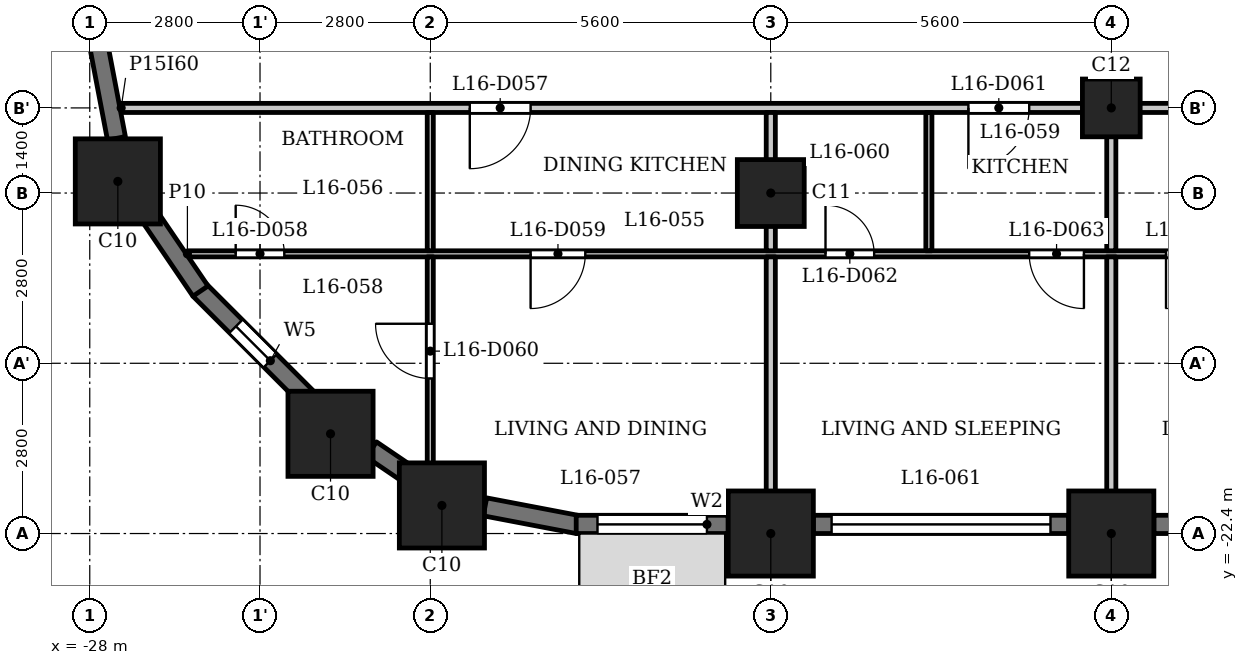
"""IFC4 building model, lengths in metres.
Left out: names, types, materials, properties, quantities, classifications, styles, units other than length and angle.
Written with IfcOpenShell. Run it as: python <this file> out.ifc"""

import sys

from ifc_helpers import new_model, si_unit, direction, frame, frame_2d, origin, origin_2d, place, context, subcontext, project, spatial, rectangle, extrude, element, fill, save


model = new_model("IFC4")
c1 = context("Model", 3, precision=1e-05, world=origin(), true_north=direction((0.0, 1.0)))
c2 = subcontext(c1, "Body", "Model", "MODEL_VIEW")
j1 = project(units=[si_unit("LENGTHUNIT", "METRE"), si_unit("PLANEANGLEUNIT", "RADIAN")], contexts=[c1])
p1 = place(None, origin())
s1 = spatial("IfcSite", under=j1, at=p1, CompositionType="ELEMENT")
p2 = place(p1, origin())
s2 = spatial("IfcBuilding", under=s1, at=p2, CompositionType="ELEMENT")
p3 = place(p2, frame((0.0, 0.0, 65.5)))
s3 = spatial("IfcBuildingStorey", under=s2, at=p3, CompositionType="ELEMENT", Elevation=65.5)
for number, where, z_axis, x_axis in (
    (1, (-22.209, -21.938, 0.0), (0.0, 0.0, 1.0), (1.0, 0.0, 0.0)),
    (2, (-16.8, -22.4, 0.0), (0.0, 0.0, 1.0), (1.0, 0.0, 0.0)),
    (3, (-11.2, -22.4, 0.0), (0.0, 0.0, 1.0), (1.0, 0.0, 0.0)),
    (4, (-27.538, -16.609, 0.0), (0.0, 0.0, 1.0), (1.0, 0.0, 0.0)),
    (5, (-24.04, -20.76, 0.0), (0.0, 0.0, 1.0), (1.0, 0.0, 0.0)),
):
    element("IfcColumn", number, at=place(p3, frame(where, z_axis=z_axis, x_axis=x_axis)), inside=s3, PredefinedType="COLUMN", context=c2, shape_type="SweptSolid", body=[
        extrude(rectangle(XDim=1.4, YDim=1.4, at=origin_2d()), origin(), (0.0, 0.0, 1.0), 3.5),
    ])
p4 = place(p3, frame((-16.8, -16.8, 0.0), z_axis=(0.0, 0.0, 1.0), x_axis=(1.0, 0.0, 0.0)))
e6 = element("IfcColumn", 6, at=p4, inside=s3, PredefinedType="COLUMN", context=c2, shape_type="SweptSolid", body=[
    extrude(rectangle(XDim=1.1, YDim=1.1, at=origin_2d()), origin(), (0.0, 0.0, 1.0), 3.5),
])
p5 = place(p3, frame((-11.2, -15.4, 0.0), z_axis=(0.0, 0.0, 1.0), x_axis=(1.0, 0.0, 0.0)))
e7 = element("IfcColumn", 7, at=p5, inside=s3, PredefinedType="COLUMN", context=c2, shape_type="SweptSolid", body=[
    extrude(rectangle(XDim=0.95, YDim=0.95, at=origin_2d()), origin(), (0.0, 0.0, 1.0), 3.5),
])
p6 = place(p3, frame((-26.197, -18.391, 0.0), z_axis=(0.0, 0.0, 1.0), x_axis=(0.707057949532, -0.707155609469, 0.0)))
e8 = element("IfcWall", 8, at=p6, inside=s3, PredefinedType="SOLIDWALL", context=c2, shape_type="SweptSolid", body=[
    extrude(rectangle(XDim=2.5, YDim=0.3, at=frame_2d((1.25, 0.0))), origin(), (0.0, 0.0, 1.0), 2.35),
])
p7 = place(p6, frame((0.85, 0.0, 0.6)))
e9 = element("IfcOpeningElement", 9, at=p7, cuts=e8, PredefinedType="OPENING", context=c2, shape_type="SweptSolid", body=[
    extrude(rectangle(XDim=0.8, YDim=1.55, at=frame_2d((0.4, 0.775))), frame((0.0, 0.16, 0.0), z_axis=(0.0, -1.0, 0.0), x_axis=(1.0, 0.0, 0.0)), (0.0, 0.0, 1.0), 0.32),
])
p8 = place(p3, frame((-23.368, -21.017, 0.0), z_axis=(0.0, 0.0, 1.0), x_axis=(0.827037530089, -0.562146710232, 0.0)))
e10 = element("IfcWall", 10, at=p8, inside=s3, PredefinedType="SOLIDWALL", context=c2, shape_type="SweptSolid", body=[
    extrude(rectangle(XDim=0.777, YDim=0.3, at=frame_2d((0.388, 0.0))), origin(), (0.0, 0.0, 1.0), 3.2),
])
p9 = place(p3, frame((-21.5, -21.961, 0.0), z_axis=(0.0, 0.0, 1.0), x_axis=(0.982297345734, -0.187328386968, 0.0)))
e11 = element("IfcWall", 11, at=p9, inside=s3, PredefinedType="SOLIDWALL", context=c2, shape_type="SweptSolid", body=[
    extrude(rectangle(XDim=1.556, YDim=0.3, at=frame_2d((0.778, 0.0))), origin(), (0.0, 0.0, 1.0), 2.35),
])
p10 = place(p3, frame((-20.0, -22.25, 0.0), z_axis=(0.0, 0.0, 1.0), x_axis=(1.0, 0.0, 0.0)))
e12 = element("IfcWall", 12, at=p10, inside=s3, PredefinedType="SOLIDWALL", context=c2, shape_type="SweptSolid", body=[
    extrude(rectangle(XDim=2.5, YDim=0.3, at=frame_2d((1.25, 0.0))), origin(), (0.0, 0.0, 1.0), 2.35),
])
p11 = place(p10, frame((0.35, 0.0, 0.9)))
e13 = element("IfcOpeningElement", 13, at=p11, cuts=e12, PredefinedType="OPENING", context=c2, shape_type="SweptSolid", body=[
    extrude(rectangle(XDim=1.8, YDim=1.25, at=frame_2d((0.9, 0.625))), frame((0.0, 0.16, 0.0), z_axis=(0.0, -1.0, 0.0), x_axis=(1.0, 0.0, 0.0)), (0.0, 0.0, 1.0), 0.32),
])
p12 = place(p3, frame((-16.1, -22.25, 0.0), z_axis=(0.0, 0.0, 1.0), x_axis=(1.0, 0.0, 0.0)))
e14 = element("IfcWall", 14, at=p12, inside=s3, PredefinedType="SOLIDWALL", context=c2, shape_type="SweptSolid", body=[
    extrude(rectangle(XDim=4.2, YDim=0.3, at=frame_2d((2.1, 0.0))), origin(), (0.0, 0.0, 1.0), 2.35),
])
p13 = place(p12, frame((0.3, 0.0, 1.2)))
e15 = element("IfcOpeningElement", 15, at=p13, cuts=e14, PredefinedType="OPENING", context=c2, shape_type="SweptSolid", body=[
    extrude(rectangle(XDim=3.6, YDim=0.95, at=frame_2d((1.8, 0.475))), frame((0.0, 0.16, 0.0), z_axis=(0.0, -1.0, 0.0), x_axis=(1.0, 0.0, 0.0)), (0.0, 0.0, 1.0), 0.32),
])
p14 = place(p3, frame((-10.5, -22.25, 0.0), z_axis=(0.0, 0.0, 1.0), x_axis=(1.0, 0.0, 0.0)))
e16 = element("IfcWall", 16, at=p14, inside=s3, PredefinedType="SOLIDWALL", context=c2, shape_type="SweptSolid", body=[
    extrude(rectangle(XDim=4.2, YDim=0.3, at=frame_2d((2.1, 0.0))), origin(), (0.0, 0.0, 1.0), 2.35),
])
p15 = place(p14, frame((0.3, 0.0, 1.2)))
e17 = element("IfcOpeningElement", 17, at=p15, cuts=e16, PredefinedType="OPENING", context=c2, shape_type="SweptSolid", body=[
    extrude(rectangle(XDim=3.6, YDim=0.95, at=frame_2d((1.8, 0.475))), frame((0.0, 0.16, 0.0), z_axis=(0.0, -1.0, 0.0), x_axis=(1.0, 0.0, 0.0)), (0.0, 0.0, 1.0), 0.32),
])
for number, where, z_axis, x_axis in (
    (18, (-27.853, -14.372, 0.0), (0.0, 0.0, 1.0), (0.187, -0.982, 0.0)),
    (19, (-27.053, -17.126, 0.0), (0.0, 0.0, 1.0), (0.562, -0.827, 0.0)),
):
    element("IfcWall", number, at=place(p3, frame(where, z_axis=z_axis, x_axis=x_axis)), inside=s3, PredefinedType="SOLIDWALL", context=c2, shape_type="SweptSolid", body=[
        extrude(rectangle(XDim=1.556, YDim=0.3, at=frame_2d((0.778, 0.0))), origin(), (0.0, 0.0, 1.0), 2.35),
    ])
p16 = place(p3, frame((-26.394, -17.8, 0.0), z_axis=(0.0, 0.0, 1.0), x_axis=(1.0, 0.0, 0.0)))
e20 = element("IfcWall", 20, at=p16, inside=s3, PredefinedType="PARTITIONING", context=c2, shape_type="SweptSolid", body=[
    extrude(rectangle(XDim=53.034, YDim=0.1, at=frame_2d((26.517, 0.0))), origin(), (0.0, 0.0, 1.0), 3.2),
])
p17 = place(p16, frame((0.794, 0.0, 0.0)))
e21 = element("IfcOpeningElement", 21, at=p17, cuts=e20, PredefinedType="OPENING", context=c2, shape_type="SweptSolid", body=[
    extrude(rectangle(XDim=0.8, YDim=2.1, at=frame_2d((0.4, 1.05))), frame((0.0, 0.06, 0.0), z_axis=(0.0, -1.0, 0.0), x_axis=(1.0, 0.0, 0.0)), (0.0, 0.0, 1.0), 0.12),
])
p18 = place(p16, frame((5.644, 0.0, 0.0)))
e22 = element("IfcOpeningElement", 22, at=p18, cuts=e20, PredefinedType="OPENING", context=c2, shape_type="SweptSolid", body=[
    extrude(rectangle(XDim=0.9, YDim=2.1, at=frame_2d((0.45, 1.05))), frame((0.0, 0.06, 0.0), z_axis=(0.0, -1.0, 0.0), x_axis=(1.0, 0.0, 0.0)), (0.0, 0.0, 1.0), 0.12),
])
p19 = place(p16, frame((10.494, 0.0, 0.0)))
e23 = element("IfcOpeningElement", 23, at=p19, cuts=e20, PredefinedType="OPENING", context=c2, shape_type="SweptSolid", body=[
    extrude(rectangle(XDim=0.8, YDim=2.1, at=frame_2d((0.4, 1.05))), frame((0.0, 0.06, 0.0), z_axis=(0.0, -1.0, 0.0), x_axis=(1.0, 0.0, 0.0)), (0.0, 0.0, 1.0), 0.12),
])
p20 = place(p16, frame((13.844, 0.0, 0.0)))
e24 = element("IfcOpeningElement", 24, at=p20, cuts=e20, PredefinedType="OPENING", context=c2, shape_type="SweptSolid", body=[
    extrude(rectangle(XDim=0.9, YDim=2.1, at=frame_2d((0.45, 1.05))), frame((0.0, 0.06, 0.0), z_axis=(0.0, -1.0, 0.0), x_axis=(1.0, 0.0, 0.0)), (0.0, 0.0, 1.0), 0.12),
])
p21 = place(p16, frame((19.344, 0.0, 0.0)))
e25 = element("IfcOpeningElement", 25, at=p21, cuts=e20, PredefinedType="OPENING", context=c2, shape_type="SweptSolid", body=[
    extrude(rectangle(XDim=0.8, YDim=2.1, at=frame_2d((0.4, 1.05))), frame((0.0, 0.06, 0.0), z_axis=(0.0, -1.0, 0.0), x_axis=(1.0, 0.0, 0.0)), (0.0, 0.0, 1.0), 0.12),
])
p22 = place(p16, frame((16.094, 0.0, 0.0)))
e26 = element("IfcOpeningElement", 26, at=p22, cuts=e20, PredefinedType="OPENING", context=c2, shape_type="SweptSolid", body=[
    extrude(rectangle(XDim=0.9, YDim=2.1, at=frame_2d((0.45, 1.05))), frame((0.0, 0.06, 0.0), z_axis=(0.0, -1.0, 0.0), x_axis=(1.0, 0.0, 0.0)), (0.0, 0.0, 1.0), 0.12),
])
p23 = place(p16, frame((24.944, 0.0, 0.0)))
e27 = element("IfcOpeningElement", 27, at=p23, cuts=e20, PredefinedType="OPENING", context=c2, shape_type="SweptSolid", body=[
    extrude(rectangle(XDim=0.8, YDim=2.1, at=frame_2d((0.4, 1.05))), frame((0.0, 0.06, 0.0), z_axis=(0.0, -1.0, 0.0), x_axis=(1.0, 0.0, 0.0)), (0.0, 0.0, 1.0), 0.12),
])
p24 = place(p16, frame((22.444, 0.0, 0.0)))
e28 = element("IfcOpeningElement", 28, at=p24, cuts=e20, PredefinedType="OPENING", context=c2, shape_type="SweptSolid", body=[
    extrude(rectangle(XDim=0.9, YDim=2.1, at=frame_2d((0.45, 1.05))), frame((0.0, 0.06, 0.0), z_axis=(0.0, -1.0, 0.0), x_axis=(1.0, 0.0, 0.0)), (0.0, 0.0, 1.0), 0.12),
])
p25 = place(p16, frame((26.944, 0.0, 0.0)))
e29 = element("IfcOpeningElement", 29, at=p25, cuts=e20, PredefinedType="OPENING", context=c2, shape_type="SweptSolid", body=[
    extrude(rectangle(XDim=0.8, YDim=2.1, at=frame_2d((0.4, 1.05))), frame((0.0, 0.06, 0.0), z_axis=(0.0, -1.0, 0.0), x_axis=(1.0, 0.0, 0.0)), (0.0, 0.0, 1.0), 0.12),
])
p26 = place(p16, frame((29.794, 0.0, 0.0)))
e30 = element("IfcOpeningElement", 30, at=p26, cuts=e20, PredefinedType="OPENING", context=c2, shape_type="SweptSolid", body=[
    extrude(rectangle(XDim=0.9, YDim=2.1, at=frame_2d((0.45, 1.05))), frame((0.0, 0.06, 0.0), z_axis=(0.0, -1.0, 0.0), x_axis=(1.0, 0.0, 0.0)), (0.0, 0.0, 1.0), 0.12),
])
p27 = place(p16, frame((33.394, 0.0, 0.0)))
e31 = element("IfcOpeningElement", 31, at=p27, cuts=e20, PredefinedType="OPENING", context=c2, shape_type="SweptSolid", body=[
    extrude(rectangle(XDim=0.9, YDim=2.1, at=frame_2d((0.45, 1.05))), frame((0.0, 0.06, 0.0), z_axis=(0.0, -1.0, 0.0), x_axis=(1.0, 0.0, 0.0)), (0.0, 0.0, 1.0), 0.12),
])
p28 = place(p16, frame((34.944, 0.0, 0.0)))
e32 = element("IfcOpeningElement", 32, at=p28, cuts=e20, PredefinedType="OPENING", context=c2, shape_type="SweptSolid", body=[
    extrude(rectangle(XDim=0.9, YDim=2.1, at=frame_2d((0.45, 1.05))), frame((0.0, 0.06, 0.0), z_axis=(0.0, -1.0, 0.0), x_axis=(1.0, 0.0, 0.0)), (0.0, 0.0, 1.0), 0.12),
])
p29 = place(p16, frame((38.144, 0.0, 0.0)))
e33 = element("IfcOpeningElement", 33, at=p29, cuts=e20, PredefinedType="OPENING", context=c2, shape_type="SweptSolid", body=[
    extrude(rectangle(XDim=0.8, YDim=2.1, at=frame_2d((0.4, 1.05))), frame((0.0, 0.06, 0.0), z_axis=(0.0, -1.0, 0.0), x_axis=(1.0, 0.0, 0.0)), (0.0, 0.0, 1.0), 0.12),
])
p30 = place(p16, frame((40.244, 0.0, 0.0)))
e34 = element("IfcOpeningElement", 34, at=p30, cuts=e20, PredefinedType="OPENING", context=c2, shape_type="SweptSolid", body=[
    extrude(rectangle(XDim=0.9, YDim=2.1, at=frame_2d((0.45, 1.05))), frame((0.0, 0.06, 0.0), z_axis=(0.0, -1.0, 0.0), x_axis=(1.0, 0.0, 0.0)), (0.0, 0.0, 1.0), 0.12),
])
p31 = place(p16, frame((49.362, 0.0, 0.0)))
e35 = element("IfcOpeningElement", 35, at=p31, cuts=e20, PredefinedType="OPENING", context=c2, shape_type="SweptSolid", body=[
    extrude(rectangle(XDim=0.8, YDim=2.1, at=frame_2d((0.4, 1.05))), frame((0.0, 0.06, 0.0), z_axis=(0.0, -1.0, 0.0), x_axis=(1.0, 0.0, 0.0)), (0.0, 0.0, 1.0), 0.12),
])
p32 = place(p16, frame((45.094, 0.0, 0.0)))
e36 = element("IfcOpeningElement", 36, at=p32, cuts=e20, PredefinedType="OPENING", context=c2, shape_type="SweptSolid", body=[
    extrude(rectangle(XDim=0.9, YDim=2.1, at=frame_2d((0.45, 1.05))), frame((0.0, 0.06, 0.0), z_axis=(0.0, -1.0, 0.0), x_axis=(1.0, 0.0, 0.0)), (0.0, 0.0, 1.0), 0.12),
])
p33 = place(p3, frame((-27.484, -15.4, 0.0), z_axis=(0.0, 0.0, 1.0), x_axis=(1.0, 0.0, 0.0)))
e37 = element("IfcWall", 37, at=p33, inside=s3, PredefinedType="PARTITIONING", context=c2, shape_type="SweptSolid", body=[
    extrude(rectangle(XDim=54.968, YDim=0.15, at=frame_2d((27.484, 0.0))), origin(), (0.0, 0.0, 1.0), 3.2),
])
p34 = place(p33, frame((5.734, 0.0, 0.0)))
e38 = element("IfcOpeningElement", 38, at=p34, cuts=e37, PredefinedType="OPENING", context=c2, shape_type="SweptSolid", body=[
    extrude(rectangle(XDim=1.0, YDim=2.1, at=frame_2d((0.5, 1.05))), frame((0.0, 0.085, 0.0), z_axis=(0.0, -1.0, 0.0), x_axis=(1.0, 0.0, 0.0)), (0.0, 0.0, 1.0), 0.17),
])
p35 = place(p33, frame((13.934, 0.0, 0.0)))
e39 = element("IfcOpeningElement", 39, at=p35, cuts=e37, PredefinedType="OPENING", context=c2, shape_type="SweptSolid", body=[
    extrude(rectangle(XDim=1.0, YDim=2.1, at=frame_2d((0.5, 1.05))), frame((0.0, 0.085, 0.0), z_axis=(0.0, -1.0, 0.0), x_axis=(1.0, 0.0, 0.0)), (0.0, 0.0, 1.0), 0.17),
])
p36 = place(p33, frame((18.184, 0.0, 0.0)))
e40 = element("IfcOpeningElement", 40, at=p36, cuts=e37, PredefinedType="OPENING", context=c2, shape_type="SweptSolid", body=[
    extrude(rectangle(XDim=1.0, YDim=2.1, at=frame_2d((0.5, 1.05))), frame((0.0, 0.085, 0.0), z_axis=(0.0, -1.0, 0.0), x_axis=(1.0, 0.0, 0.0)), (0.0, 0.0, 1.0), 0.17),
])
p37 = place(p33, frame((22.534, 0.0, 0.0)))
e41 = element("IfcOpeningElement", 41, at=p37, cuts=e37, PredefinedType="OPENING", context=c2, shape_type="SweptSolid", body=[
    extrude(rectangle(XDim=1.0, YDim=2.1, at=frame_2d((0.5, 1.05))), frame((0.0, 0.085, 0.0), z_axis=(0.0, -1.0, 0.0), x_axis=(1.0, 0.0, 0.0)), (0.0, 0.0, 1.0), 0.17),
])
p38 = place(p33, frame((36.984, 0.0, 0.0)))
e42 = element("IfcOpeningElement", 42, at=p38, cuts=e37, PredefinedType="OPENING", context=c2, shape_type="SweptSolid", body=[
    extrude(rectangle(XDim=1.0, YDim=2.1, at=frame_2d((0.5, 1.05))), frame((0.0, 0.085, 0.0), z_axis=(0.0, -1.0, 0.0), x_axis=(1.0, 0.0, 0.0)), (0.0, 0.0, 1.0), 0.17),
])
p39 = place(p33, frame((42.334, 0.0, 0.0)))
e43 = element("IfcOpeningElement", 43, at=p39, cuts=e37, PredefinedType="OPENING", context=c2, shape_type="SweptSolid", body=[
    extrude(rectangle(XDim=1.0, YDim=2.1, at=frame_2d((0.5, 1.05))), frame((0.0, 0.085, 0.0), z_axis=(0.0, -1.0, 0.0), x_axis=(1.0, 0.0, 0.0)), (0.0, 0.0, 1.0), 0.17),
])
p40 = place(p33, frame((45.184, 0.0, 0.0)))
e44 = element("IfcOpeningElement", 44, at=p40, cuts=e37, PredefinedType="OPENING", context=c2, shape_type="SweptSolid", body=[
    extrude(rectangle(XDim=1.0, YDim=2.1, at=frame_2d((0.5, 1.05))), frame((0.0, 0.085, 0.0), z_axis=(0.0, -1.0, 0.0), x_axis=(1.0, 0.0, 0.0)), (0.0, 0.0, 1.0), 0.17),
])
p41 = place(p3, frame((-22.4, -21.72, 0.0), z_axis=(0.0, 0.0, 1.0), x_axis=(0.0, 1.0, 0.0)))
e45 = element("IfcWall", 45, at=p41, inside=s3, PredefinedType="PARTITIONING", context=c2, shape_type="SweptSolid", body=[
    extrude(rectangle(XDim=3.87, YDim=0.1, at=frame_2d((1.935, 0.0))), origin(), (0.0, 0.0, 1.0), 3.2),
])
p42 = place(p41, frame((1.87, 0.0, 0.0)))
e46 = element("IfcOpeningElement", 46, at=p42, cuts=e45, PredefinedType="OPENING", context=c2, shape_type="SweptSolid", body=[
    extrude(rectangle(XDim=0.9, YDim=2.1, at=frame_2d((0.45, 1.05))), frame((0.0, 0.06, 0.0), z_axis=(0.0, -1.0, 0.0), x_axis=(1.0, 0.0, 0.0)), (0.0, 0.0, 1.0), 0.12),
])
p43 = place(p3, frame((-22.4, -17.75, 0.0), z_axis=(0.0, 0.0, 1.0), x_axis=(0.0, 1.0, 0.0)))
e47 = element("IfcWall", 47, at=p43, inside=s3, PredefinedType="PARTITIONING", context=c2, shape_type="SweptSolid", body=[
    extrude(rectangle(XDim=2.275, YDim=0.1, at=frame_2d((1.137, 0.0))), origin(), (0.0, 0.0, 1.0), 3.2),
])
p44 = place(p3, frame((-16.8, -23.08, 0.0), z_axis=(0.0, 0.0, 1.0), x_axis=(0.0, 1.0, 0.0)))
e48 = element("IfcWall", 48, at=p44, inside=s3, PredefinedType="PARTITIONING", context=c2, shape_type="SweptSolid", body=[
    extrude(rectangle(XDim=5.23, YDim=0.15, at=frame_2d((2.615, 0.0))), origin(), (0.0, 0.0, 1.0), 3.2),
])
p45 = place(p3, frame((-16.8, -17.75, 0.0), z_axis=(0.0, 0.0, 1.0), x_axis=(0.0, 1.0, 0.0)))
e49 = element("IfcWall", 49, at=p45, inside=s3, PredefinedType="PARTITIONING", context=c2, shape_type="SweptSolid", body=[
    extrude(rectangle(XDim=2.275, YDim=0.15, at=frame_2d((1.137, 0.0))), origin(), (0.0, 0.0, 1.0), 3.2),
])
p46 = place(p3, frame((-14.2, -17.75, 0.0), z_axis=(0.0, 0.0, 1.0), x_axis=(0.0, 1.0, 0.0)))
e50 = element("IfcWall", 50, at=p46, inside=s3, PredefinedType="PARTITIONING", context=c2, shape_type="SweptSolid", body=[
    extrude(rectangle(XDim=2.275, YDim=0.1, at=frame_2d((1.137, 0.0))), origin(), (0.0, 0.0, 1.0), 3.2),
])
p47 = place(p3, frame((-11.2, -23.08, 0.0), z_axis=(0.0, 0.0, 1.0), x_axis=(0.0, 1.0, 0.0)))
e51 = element("IfcWall", 51, at=p47, inside=s3, PredefinedType="PARTITIONING", context=c2, shape_type="SweptSolid", body=[
    extrude(rectangle(XDim=5.23, YDim=0.15, at=frame_2d((2.615, 0.0))), origin(), (0.0, 0.0, 1.0), 3.2),
])
p48 = place(p3, frame((-11.2, -17.75, 0.0), z_axis=(0.0, 0.0, 1.0), x_axis=(0.0, 1.0, 0.0)))
e52 = element("IfcWall", 52, at=p48, inside=s3, PredefinedType="PARTITIONING", context=c2, shape_type="SweptSolid", body=[
    extrude(rectangle(XDim=2.275, YDim=0.15, at=frame_2d((1.137, 0.0))), origin(), (0.0, 0.0, 1.0), 3.2),
])
p49 = place(p34, origin())
e53 = element("IfcDoor", 53, at=p49, inside=s3, OperationType="SINGLE_SWING_LEFT", PredefinedType="DOOR", context=c2, shape_type="SweptSolid", body=[
    extrude(rectangle(XDim=1.0, YDim=2.1, at=frame_2d((0.5, 1.05))), frame((0.0, 0.025, 0.0), z_axis=(0.0, -1.0, 0.0), x_axis=(1.0, 0.0, 0.0)), (0.0, 0.0, 1.0), 0.05),
])
fill(e38, e53)
p50 = place(p17, origin())
e54 = element("IfcDoor", 54, at=p50, inside=s3, OperationType="SINGLE_SWING_RIGHT", PredefinedType="DOOR", context=c2, shape_type="SweptSolid", body=[
    extrude(rectangle(XDim=0.8, YDim=2.1, at=frame_2d((0.4, 1.05))), frame((0.0, 0.025, 0.0), z_axis=(0.0, -1.0, 0.0), x_axis=(1.0, 0.0, 0.0)), (0.0, 0.0, 1.0), 0.05),
])
fill(e21, e54)
p51 = place(p18, origin())
e55 = element("IfcDoor", 55, at=p51, inside=s3, OperationType="SINGLE_SWING_LEFT", PredefinedType="DOOR", context=c2, shape_type="SweptSolid", body=[
    extrude(rectangle(XDim=0.9, YDim=2.1, at=frame_2d((0.45, 1.05))), frame((0.0, 0.025, 0.0), z_axis=(0.0, -1.0, 0.0), x_axis=(1.0, 0.0, 0.0)), (0.0, 0.0, 1.0), 0.05),
])
fill(e22, e55)
p52 = place(p42, origin())
e56 = element("IfcDoor", 56, at=p52, inside=s3, OperationType="SINGLE_SWING_LEFT", PredefinedType="DOOR", context=c2, shape_type="SweptSolid", body=[
    extrude(rectangle(XDim=0.9, YDim=2.1, at=frame_2d((0.45, 1.05))), frame((0.0, 0.025, 0.0), z_axis=(0.0, -1.0, 0.0), x_axis=(1.0, 0.0, 0.0)), (0.0, 0.0, 1.0), 0.05),
])
fill(e46, e56)
p53 = place(p35, origin())
e57 = element("IfcDoor", 57, at=p53, inside=s3, OperationType="SINGLE_SWING_LEFT", PredefinedType="DOOR", context=c2, shape_type="SweptSolid", body=[
    extrude(rectangle(XDim=1.0, YDim=2.1, at=frame_2d((0.5, 1.05))), frame((0.0, 0.025, 0.0), z_axis=(0.0, -1.0, 0.0), x_axis=(1.0, 0.0, 0.0)), (0.0, 0.0, 1.0), 0.05),
])
fill(e39, e57)
p54 = place(p19, origin())
e58 = element("IfcDoor", 58, at=p54, inside=s3, OperationType="SINGLE_SWING_RIGHT", PredefinedType="DOOR", context=c2, shape_type="SweptSolid", body=[
    extrude(rectangle(XDim=0.8, YDim=2.1, at=frame_2d((0.4, 1.05))), frame((0.0, 0.025, 0.0), z_axis=(0.0, -1.0, 0.0), x_axis=(1.0, 0.0, 0.0)), (0.0, 0.0, 1.0), 0.05),
])
fill(e23, e58)
p55 = place(p20, origin())
e59 = element("IfcDoor", 59, at=p55, inside=s3, OperationType="SINGLE_SWING_RIGHT", PredefinedType="DOOR", context=c2, shape_type="SweptSolid", body=[
    extrude(rectangle(XDim=0.9, YDim=2.1, at=frame_2d((0.45, 1.05))), frame((0.0, 0.025, 0.0), z_axis=(0.0, -1.0, 0.0), x_axis=(1.0, 0.0, 0.0)), (0.0, 0.0, 1.0), 0.05),
])
fill(e24, e59)
p56 = place(p22, origin())
e60 = element("IfcDoor", 60, at=p56, inside=s3, OperationType="SINGLE_SWING_LEFT", PredefinedType="DOOR", context=c2, shape_type="SweptSolid", body=[
    extrude(rectangle(XDim=0.9, YDim=2.1, at=frame_2d((0.45, 1.05))), frame((0.0, 0.025, 0.0), z_axis=(0.0, -1.0, 0.0), x_axis=(1.0, 0.0, 0.0)), (0.0, 0.0, 1.0), 0.05),
])
fill(e26, e60)
p57 = place(p7, origin())
e61 = element("IfcWindow", 61, at=p57, inside=s3, PartitioningType="SINGLE_PANEL", PredefinedType="WINDOW", context=c2, shape_type="SweptSolid", body=[
    extrude(rectangle(XDim=0.8, YDim=1.55, at=frame_2d((0.4, 0.775))), frame((0.0, 0.03, 0.0), z_axis=(0.0, -1.0, 0.0), x_axis=(1.0, 0.0, 0.0)), (0.0, 0.0, 1.0), 0.06),
])
fill(e9, e61)
p58 = place(p11, origin())
e62 = element("IfcWindow", 62, at=p58, inside=s3, PartitioningType="SINGLE_PANEL", PredefinedType="WINDOW", context=c2, shape_type="SweptSolid", body=[
    extrude(rectangle(XDim=1.8, YDim=1.25, at=frame_2d((0.9, 0.625))), frame((0.0, 0.03, 0.0), z_axis=(0.0, -1.0, 0.0), x_axis=(1.0, 0.0, 0.0)), (0.0, 0.0, 1.0), 0.06),
])
fill(e13, e62)
p59 = place(p13, origin())
e63 = element("IfcWindow", 63, at=p59, inside=s3, PartitioningType="SINGLE_PANEL", PredefinedType="WINDOW", context=c2, shape_type="SweptSolid", body=[
    extrude(rectangle(XDim=3.6, YDim=0.95, at=frame_2d((1.8, 0.475))), frame((0.0, 0.03, 0.0), z_axis=(0.0, -1.0, 0.0), x_axis=(1.0, 0.0, 0.0)), (0.0, 0.0, 1.0), 0.06),
])
fill(e15, e63)
save(model, sys.argv[1])
